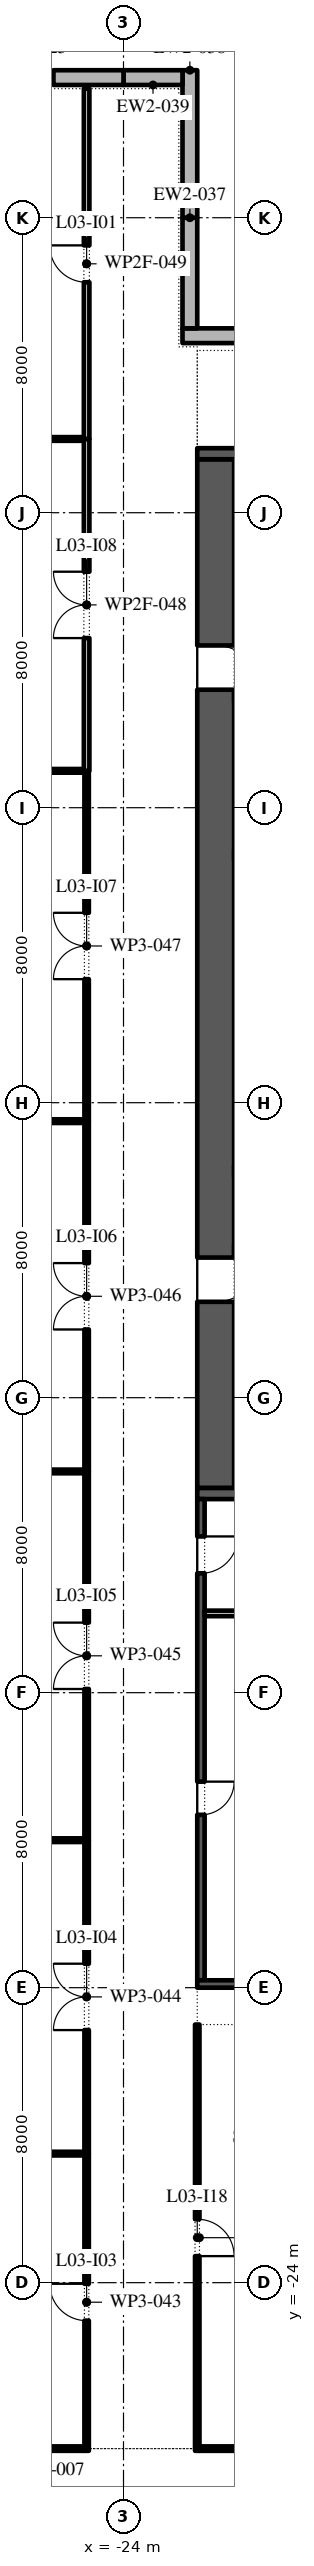
"""IFC4 building model, lengths in metres.
Left out: names, types, materials, properties, quantities, classifications, styles, units other than length and angle.
Written with IfcOpenShell. Run it as: python <this file> out.ifc"""

import sys

from ifc_helpers import new_model, si_unit, direction, frame, frame_2d, origin, place, context, subcontext, project, spatial, polyline, rectangle, outline, extrude, element, fill, save


model = new_model("IFC4")
c1 = context("Model", 3, precision=1e-05, world=origin(), true_north=direction((0.0, 1.0)))
c2 = subcontext(c1, "Body", "Model", "MODEL_VIEW")
j1 = project(units=[si_unit("LENGTHUNIT", "METRE"), si_unit("PLANEANGLEUNIT", "RADIAN")], contexts=[c1])
p1 = place(None, origin())
s1 = spatial("IfcSite", under=j1, at=p1, CompositionType="ELEMENT")
p2 = place(p1, origin())
s2 = spatial("IfcBuilding", under=s1, at=p2, CompositionType="ELEMENT")
p3 = place(p2, frame((0.0, 0.0, 19.2)))
s3 = spatial("IfcBuildingStorey", under=s2, at=p3, CompositionType="ELEMENT", Elevation=19.2)
p4 = place(p3, frame((-16.0, 28.8, 0.0), z_axis=(0.0, 0.0, 1.0), x_axis=(-1.0, 0.0, 0.0)))
e1 = element("IfcWall", 1, at=p4, inside=s3, PredefinedType="STANDARD", context=c2, shape_type="SweptSolid", body=[
    extrude(rectangle(XDim=6.4, YDim=0.4, at=frame_2d((3.2, 0.0))), origin(), (0.0, 0.0, 1.0), 4.5),
])
p5 = place(p3, frame((-22.2, 29.0, 0.0), z_axis=(0.0, 0.0, 1.0), x_axis=(0.0, 1.0, 0.0)))
e2 = element("IfcWall", 2, at=p5, inside=s3, PredefinedType="STANDARD", context=c2, shape_type="SweptSolid", body=[
    extrude(rectangle(XDim=3.0, YDim=0.4, at=frame_2d((1.5, 0.0))), origin(), (0.0, 0.0, 1.0), 4.5),
])
p6 = place(p3, frame((-22.2, 32.0, 0.0), z_axis=(0.0, 0.0, 1.0), x_axis=(0.0, 1.0, 0.0)))
e3 = element("IfcWall", 3, at=p6, inside=s3, PredefinedType="STANDARD", context=c2, shape_type="SweptSolid", body=[
    extrude(rectangle(XDim=4.0, YDim=0.4, at=frame_2d((2.0, 0.0))), origin(), (0.0, 0.0, 1.0), 4.5),
])
p7 = place(p3, frame((-22.4, 35.8, 0.0), z_axis=(0.0, 0.0, 1.0), x_axis=(-1.0, 0.0, 0.0)))
e4 = element("IfcWall", 4, at=p7, inside=s3, PredefinedType="STANDARD", context=c2, shape_type="SweptSolid", body=[
    extrude(rectangle(XDim=1.6, YDim=0.4, at=frame_2d((0.8, 0.0))), origin(), (0.0, 0.0, 1.0), 4.5),
])
p8 = place(p3, frame((-24.0, 35.8, 0.0), z_axis=(0.0, 0.0, 1.0), x_axis=(-1.0, 0.0, 0.0)))
e5 = element("IfcWall", 5, at=p8, inside=s3, PredefinedType="STANDARD", context=c2, shape_type="SweptSolid", body=[
    extrude(rectangle(XDim=8.0, YDim=0.4, at=frame_2d((4.0, 0.0))), origin(), (0.0, 0.0, 1.0), 4.5),
])
p9 = place(p8, frame((1.9, 0.0, 0.9)))
e6 = element("IfcOpeningElement", 6, at=p9, cuts=e5, PredefinedType="OPENING", context=c2, shape_type="SweptSolid", body=[
    extrude(outline(polyline([(0.0, 0.0), (1.8, 0.0), (1.8, 1.5), (1.785, 1.729), (1.738, 1.954), (1.662, 2.17), (1.558, 2.375), (1.427, 2.563), (1.271, 2.732), (1.095, 2.879), (0.9, 3.0), (0.705, 2.879), (0.529, 2.732), (0.373, 2.563), (0.242, 2.375), (0.138, 2.17), (0.062, 1.954), (0.015, 1.729), (0.0, 1.5), (0.0, 0.0)])), frame((0.0, 0.21, 0.0), z_axis=(0.0, -1.0, 0.0), x_axis=(1.0, 0.0, 0.0)), (0.0, 0.0, 1.0), 0.42),
])
p10 = place(p8, frame((4.3, 0.0, 0.9)))
e7 = element("IfcOpeningElement", 7, at=p10, cuts=e5, PredefinedType="OPENING", context=c2, shape_type="SweptSolid", body=[
    extrude(outline(polyline([(0.0, 0.0), (1.8, 0.0), (1.8, 1.5), (1.785, 1.729), (1.738, 1.954), (1.662, 2.17), (1.558, 2.375), (1.427, 2.563), (1.271, 2.732), (1.095, 2.879), (0.9, 3.0), (0.705, 2.879), (0.529, 2.732), (0.373, 2.563), (0.242, 2.375), (0.138, 2.17), (0.062, 1.954), (0.015, 1.729), (0.0, 1.5), (0.0, 0.0)])), frame((0.0, 0.21, 0.0), z_axis=(0.0, -1.0, 0.0), x_axis=(1.0, 0.0, 0.0)), (0.0, 0.0, 1.0), 0.42),
])
p11 = place(p3, frame((-21.5, -2.45, 0.0), z_axis=(0.0, 0.0, 1.0), x_axis=(0.0, 1.0, 0.0)))
e8 = element("IfcWall", 8, at=p11, inside=s3, PredefinedType="SHEAR", context=c2, shape_type="SweptSolid", body=[
    extrude(rectangle(XDim=27.9, YDim=1.0, at=frame_2d((13.95, 0.0))), origin(), (0.0, 0.0, 1.0), 4.5),
])
p12 = place(p11, frame((5.05, 0.0, 0.0)))
e9 = element("IfcOpeningElement", 9, at=p12, cuts=e8, PredefinedType="OPENING", context=c2, shape_type="SweptSolid", body=[
    extrude(rectangle(XDim=1.2, YDim=2.1, at=frame_2d((0.6, 1.05))), frame((0.0, 0.51, 0.0), z_axis=(0.0, -1.0, 0.0), x_axis=(1.0, 0.0, 0.0)), (0.0, 0.0, 1.0), 1.02),
])
p13 = place(p11, frame((21.65, 0.0, 0.0)))
e10 = element("IfcOpeningElement", 10, at=p13, cuts=e8, PredefinedType="OPENING", context=c2, shape_type="SweptSolid", body=[
    extrude(rectangle(XDim=1.2, YDim=2.1, at=frame_2d((0.6, 1.05))), frame((0.0, 0.51, 0.0), z_axis=(0.0, -1.0, 0.0), x_axis=(1.0, 0.0, 0.0)), (0.0, 0.0, 1.0), 1.02),
])
for number, where, z_axis, x_axis in (
    (11, (-22.0, -2.6, 0.0), (0.0, 0.0, 1.0), (1.0, 0.0, 0.0)),
    (12, (-22.0, 25.6, 0.0), (0.0, 0.0, 1.0), (1.0, 0.0, 0.0)),
):
    element("IfcWall", number, at=place(p3, frame(where, z_axis=z_axis, x_axis=x_axis)), inside=s3, PredefinedType="SHEAR", context=c2, shape_type="SweptSolid", body=[
        extrude(rectangle(XDim=12.0, YDim=0.3, at=frame_2d((6.0, 0.0))), origin(), (0.0, 0.0, 1.0), 4.5),
    ])
p14 = place(p3, frame((-21.9, -15.8, 0.0), z_axis=(0.0, 0.0, 1.0), x_axis=(0.0, 1.0, 0.0)))
e13 = element("IfcWall", 13, at=p14, inside=s3, PredefinedType="SHEAR", context=c2, shape_type="SweptSolid", body=[
    extrude(rectangle(XDim=13.05, YDim=0.2, at=frame_2d((6.525, 0.0))), origin(), (0.0, 0.0, 1.0), 4.5),
])
p15 = place(p14, frame((4.488, 0.0, 0.0)))
e14 = element("IfcOpeningElement", 14, at=p15, cuts=e13, PredefinedType="OPENING", context=c2, shape_type="SweptSolid", body=[
    extrude(rectangle(XDim=0.9, YDim=2.1, at=frame_2d((0.45, 1.05))), frame((0.0, 0.11, 0.0), z_axis=(0.0, -1.0, 0.0), x_axis=(1.0, 0.0, 0.0)), (0.0, 0.0, 1.0), 0.22),
])
p16 = place(p14, frame((11.038, 0.0, 0.0)))
e15 = element("IfcOpeningElement", 15, at=p16, cuts=e13, PredefinedType="OPENING", context=c2, shape_type="SweptSolid", body=[
    extrude(rectangle(XDim=1.0, YDim=2.1, at=frame_2d((0.5, 1.05))), frame((0.0, 0.11, 0.0), z_axis=(0.0, -1.0, 0.0), x_axis=(1.0, 0.0, 0.0)), (0.0, 0.0, 1.0), 0.22),
])
p17 = place(p3, frame((-22.0, -15.9, 0.0), z_axis=(0.0, 0.0, 1.0), x_axis=(1.0, 0.0, 0.0)))
e16 = element("IfcWall", 16, at=p17, inside=s3, PredefinedType="SHEAR", context=c2, shape_type="SweptSolid", body=[
    extrude(rectangle(XDim=12.0, YDim=0.2, at=frame_2d((6.0, 0.0))), origin(), (0.0, 0.0, 1.0), 4.5),
])
p18 = place(p3, frame((-21.8, -5.85, 0.0), z_axis=(0.0, 0.0, 1.0), x_axis=(1.0, 0.0, 0.0)))
e17 = element("IfcWall", 17, at=p18, inside=s3, PredefinedType="PARTITIONING", context=c2, shape_type="SweptSolid", body=[
    extrude(rectangle(XDim=5.725, YDim=0.15, at=frame_2d((2.863, 0.0))), origin(), (0.0, 0.0, 1.0), 4.5),
])
p19 = place(p3, frame((-27.0, -28.5, 0.0), z_axis=(0.0, 0.0, 1.0), x_axis=(1.0, 0.0, 0.0)))
e18 = element("IfcWall", 18, at=p19, inside=s3, PredefinedType="PARTITIONING", context=c2, shape_type="SweptSolid", body=[
    extrude(rectangle(XDim=1.94, YDim=0.12, at=frame_2d((0.97, 0.0))), origin(), (0.0, 0.0, 1.0), 4.5),
])
p20 = place(p3, frame((-21.94, -28.5, 0.0), z_axis=(0.0, 0.0, 1.0), x_axis=(1.0, 0.0, 0.0)))
e19 = element("IfcWall", 19, at=p20, inside=s3, PredefinedType="PARTITIONING", context=c2, shape_type="SweptSolid", body=[
    extrude(rectangle(XDim=11.54, YDim=0.12, at=frame_2d((5.77, 0.0))), origin(), (0.0, 0.0, 1.0), 4.5),
])
for number, where, z_axis, x_axis in (
    (20, (-43.5, -20.5, 0.0), (0.0, 0.0, 1.0), (1.0, 0.0, 0.0)),
    (21, (-43.5, -12.0, 0.0), (0.0, 0.0, 1.0), (1.0, 0.0, 0.0)),
    (22, (-43.5, -2.0, 0.0), (0.0, 0.0, 1.0), (1.0, 0.0, 0.0)),
    (23, (-43.5, 7.5, 0.0), (0.0, 0.0, 1.0), (1.0, 0.0, 0.0)),
):
    element("IfcWall", number, at=place(p3, frame(where, z_axis=z_axis, x_axis=x_axis)), inside=s3, PredefinedType="PARTITIONING", context=c2, shape_type="SweptSolid", body=[
        extrude(rectangle(XDim=18.44, YDim=0.1, at=frame_2d((9.22, 0.0))), origin(), (0.0, 0.0, 1.0), 4.5),
    ])
p21 = place(p3, frame((-43.5, 17.0, 0.0), z_axis=(0.0, 0.0, 1.0), x_axis=(1.0, 0.0, 0.0)))
e24 = element("IfcWall", 24, at=p21, inside=s3, PredefinedType="PARTITIONING", context=c2, shape_type="SweptSolid", body=[
    extrude(rectangle(XDim=18.425, YDim=0.1, at=frame_2d((9.212, 0.0))), origin(), (0.0, 0.0, 1.0), 4.5),
])
p22 = place(p3, frame((-34.0, 26.0, 0.0), z_axis=(0.0, 0.0, 1.0), x_axis=(1.0, 0.0, 0.0)))
e25 = element("IfcWall", 25, at=p22, inside=s3, PredefinedType="PARTITIONING", context=c2, shape_type="SweptSolid", body=[
    extrude(rectangle(XDim=8.925, YDim=0.1, at=frame_2d((4.462, 0.0))), origin(), (0.0, 0.0, 1.0), 4.5),
])
p23 = place(p3, frame((-25.0, -28.56, 0.0), z_axis=(0.0, 0.0, 1.0), x_axis=(0.0, 1.0, 0.0)))
e26 = element("IfcWall", 26, at=p23, inside=s3, PredefinedType="PARTITIONING", context=c2, shape_type="SweptSolid", body=[
    extrude(rectangle(XDim=8.06, YDim=0.12, at=frame_2d((4.03, 0.0))), origin(), (0.0, 0.0, 1.0), 4.5),
])
p24 = place(p23, frame((3.53, 0.0, 0.0)))
e27 = element("IfcOpeningElement", 27, at=p24, cuts=e26, PredefinedType="OPENING", context=c2, shape_type="SweptSolid", body=[
    extrude(rectangle(XDim=1.0, YDim=2.1, at=frame_2d((0.5, 1.05))), frame((0.0, 0.07, 0.0), z_axis=(0.0, -1.0, 0.0), x_axis=(1.0, 0.0, 0.0)), (0.0, 0.0, 1.0), 0.14),
])
p25 = place(p3, frame((-25.0, -20.5, 0.0), z_axis=(0.0, 0.0, 1.0), x_axis=(0.0, 1.0, 0.0)))
e28 = element("IfcWall", 28, at=p25, inside=s3, PredefinedType="PARTITIONING", context=c2, shape_type="SweptSolid", body=[
    extrude(rectangle(XDim=8.5, YDim=0.12, at=frame_2d((4.25, 0.0))), origin(), (0.0, 0.0, 1.0), 4.5),
])
p26 = place(p25, frame((3.35, 0.0, 0.0)))
e29 = element("IfcOpeningElement", 29, at=p26, cuts=e28, PredefinedType="OPENING", context=c2, shape_type="SweptSolid", body=[
    extrude(rectangle(XDim=1.8, YDim=2.1, at=frame_2d((0.9, 1.05))), frame((0.0, 0.07, 0.0), z_axis=(0.0, -1.0, 0.0), x_axis=(1.0, 0.0, 0.0)), (0.0, 0.0, 1.0), 0.14),
])
p27 = place(p3, frame((-25.0, -12.0, 0.0), z_axis=(0.0, 0.0, 1.0), x_axis=(0.0, 1.0, 0.0)))
e30 = element("IfcWall", 30, at=p27, inside=s3, PredefinedType="PARTITIONING", context=c2, shape_type="SweptSolid", body=[
    extrude(rectangle(XDim=10.0, YDim=0.12, at=frame_2d((5.0, 0.0))), origin(), (0.0, 0.0, 1.0), 4.5),
])
p28 = place(p27, frame((4.1, 0.0, 0.0)))
e31 = element("IfcOpeningElement", 31, at=p28, cuts=e30, PredefinedType="OPENING", context=c2, shape_type="SweptSolid", body=[
    extrude(rectangle(XDim=1.8, YDim=2.1, at=frame_2d((0.9, 1.05))), frame((0.0, 0.07, 0.0), z_axis=(0.0, -1.0, 0.0), x_axis=(1.0, 0.0, 0.0)), (0.0, 0.0, 1.0), 0.14),
])
p29 = place(p3, frame((-25.0, -2.0, 0.0), z_axis=(0.0, 0.0, 1.0), x_axis=(0.0, 1.0, 0.0)))
e32 = element("IfcWall", 32, at=p29, inside=s3, PredefinedType="PARTITIONING", context=c2, shape_type="SweptSolid", body=[
    extrude(rectangle(XDim=9.5, YDim=0.12, at=frame_2d((4.75, 0.0))), origin(), (0.0, 0.0, 1.0), 4.5),
])
p30 = place(p29, frame((3.85, 0.0, 0.0)))
e33 = element("IfcOpeningElement", 33, at=p30, cuts=e32, PredefinedType="OPENING", context=c2, shape_type="SweptSolid", body=[
    extrude(rectangle(XDim=1.8, YDim=2.1, at=frame_2d((0.9, 1.05))), frame((0.0, 0.07, 0.0), z_axis=(0.0, -1.0, 0.0), x_axis=(1.0, 0.0, 0.0)), (0.0, 0.0, 1.0), 0.14),
])
p31 = place(p3, frame((-25.0, 7.5, 0.0), z_axis=(0.0, 0.0, 1.0), x_axis=(0.0, 1.0, 0.0)))
e34 = element("IfcWall", 34, at=p31, inside=s3, PredefinedType="PARTITIONING", context=c2, shape_type="SweptSolid", body=[
    extrude(rectangle(XDim=9.5, YDim=0.12, at=frame_2d((4.75, 0.0))), origin(), (0.0, 0.0, 1.0), 4.5),
])
p32 = place(p31, frame((3.85, 0.0, 0.0)))
e35 = element("IfcOpeningElement", 35, at=p32, cuts=e34, PredefinedType="OPENING", context=c2, shape_type="SweptSolid", body=[
    extrude(rectangle(XDim=1.8, YDim=2.1, at=frame_2d((0.9, 1.05))), frame((0.0, 0.07, 0.0), z_axis=(0.0, -1.0, 0.0), x_axis=(1.0, 0.0, 0.0)), (0.0, 0.0, 1.0), 0.14),
])
p33 = place(p3, frame((-25.0, 17.0, 0.0), z_axis=(0.0, 0.0, 1.0), x_axis=(0.0, 1.0, 0.0)))
e36 = element("IfcWall", 36, at=p33, inside=s3, PredefinedType="PARTITIONING", context=c2, shape_type="SweptSolid", body=[
    extrude(rectangle(XDim=9.0, YDim=0.15, at=frame_2d((4.5, 0.0))), origin(), (0.0, 0.0, 1.0), 4.5),
])
p34 = place(p33, frame((3.6, 0.0, 0.0)))
e37 = element("IfcOpeningElement", 37, at=p34, cuts=e36, PredefinedType="OPENING", context=c2, shape_type="SweptSolid", body=[
    extrude(rectangle(XDim=1.8, YDim=2.1, at=frame_2d((0.9, 1.05))), frame((0.0, 0.085, 0.0), z_axis=(0.0, -1.0, 0.0), x_axis=(1.0, 0.0, 0.0)), (0.0, 0.0, 1.0), 0.17),
])
p35 = place(p3, frame((-25.0, 26.0, 0.0), z_axis=(0.0, 0.0, 1.0), x_axis=(0.0, 1.0, 0.0)))
e38 = element("IfcWall", 38, at=p35, inside=s3, PredefinedType="PARTITIONING", context=c2, shape_type="SweptSolid", body=[
    extrude(rectangle(XDim=9.5, YDim=0.15, at=frame_2d((4.75, 0.0))), origin(), (0.0, 0.0, 1.0), 4.5),
])
p36 = place(p35, frame((4.25, 0.0, 0.0)))
e39 = element("IfcOpeningElement", 39, at=p36, cuts=e38, PredefinedType="OPENING", context=c2, shape_type="SweptSolid", body=[
    extrude(rectangle(XDim=1.0, YDim=2.1, at=frame_2d((0.5, 1.05))), frame((0.0, 0.085, 0.0), z_axis=(0.0, -1.0, 0.0), x_axis=(1.0, 0.0, 0.0)), (0.0, 0.0, 1.0), 0.17),
])
p37 = place(p3, frame((-22.0, -28.56, 0.0), z_axis=(0.0, 0.0, 1.0), x_axis=(0.0, 1.0, 0.0)))
e40 = element("IfcWall", 40, at=p37, inside=s3, PredefinedType="PARTITIONING", context=c2, shape_type="SweptSolid", body=[
    extrude(rectangle(XDim=11.56, YDim=0.12, at=frame_2d((5.78, 0.0))), origin(), (0.0, 0.0, 1.0), 4.5),
])
p38 = place(p37, frame((5.28, 0.0, 0.0)))
e41 = element("IfcOpeningElement", 41, at=p38, cuts=e40, PredefinedType="OPENING", context=c2, shape_type="SweptSolid", body=[
    extrude(rectangle(XDim=1.0, YDim=2.1, at=frame_2d((0.5, 1.05))), frame((0.0, 0.07, 0.0), z_axis=(0.0, -1.0, 0.0), x_axis=(1.0, 0.0, 0.0)), (0.0, 0.0, 1.0), 0.14),
])
p39 = place(p9, origin())
e42 = element("IfcWindow", 42, at=p39, inside=s3, PartitioningType="DOUBLE_PANEL_VERTICAL", PredefinedType="WINDOW", context=c2, shape_type="SweptSolid", body=[
    extrude(outline(polyline([(0.0, 0.0), (1.8, 0.0), (1.8, 1.5), (1.785, 1.729), (1.738, 1.954), (1.662, 2.17), (1.558, 2.375), (1.427, 2.563), (1.271, 2.732), (1.095, 2.879), (0.9, 3.0), (0.705, 2.879), (0.529, 2.732), (0.373, 2.563), (0.242, 2.375), (0.138, 2.17), (0.062, 1.954), (0.015, 1.729), (0.0, 1.5), (0.0, 0.0)])), frame((0.0, 0.03, 0.0), z_axis=(0.0, -1.0, 0.0), x_axis=(1.0, 0.0, 0.0)), (0.0, 0.0, 1.0), 0.06),
])
fill(e6, e42)
p40 = place(p12, frame((1.2, 0.0, 0.0), z_axis=(0.0, 0.0, 1.0), x_axis=(-1.0, 0.0, 0.0)))
e43 = element("IfcDoor", 43, at=p40, inside=s3, OperationType="SINGLE_SWING_RIGHT", PredefinedType="DOOR", context=c2, shape_type="SweptSolid", body=[
    extrude(rectangle(XDim=1.2, YDim=2.1, at=frame_2d((0.6, 1.05))), frame((0.0, 0.025, 0.0), z_axis=(0.0, -1.0, 0.0), x_axis=(1.0, 0.0, 0.0)), (0.0, 0.0, 1.0), 0.05),
])
fill(e9, e43)
p41 = place(p13, frame((1.2, 0.0, 0.0), z_axis=(0.0, 0.0, 1.0), x_axis=(-1.0, 0.0, 0.0)))
e44 = element("IfcDoor", 44, at=p41, inside=s3, OperationType="SINGLE_SWING_LEFT", PredefinedType="DOOR", context=c2, shape_type="SweptSolid", body=[
    extrude(rectangle(XDim=1.2, YDim=2.1, at=frame_2d((0.6, 1.05))), frame((0.0, 0.025, 0.0), z_axis=(0.0, -1.0, 0.0), x_axis=(1.0, 0.0, 0.0)), (0.0, 0.0, 1.0), 0.05),
])
fill(e10, e44)
p42 = place(p15, frame((0.9, -0.15, 0.0), z_axis=(0.0, 0.0, 1.0), x_axis=(-1.0, 0.0, 0.0)))
e45 = element("IfcDoor", 45, at=p42, inside=s3, OperationType="SINGLE_SWING_RIGHT", PredefinedType="DOOR", context=c2, shape_type="SweptSolid", body=[
    extrude(rectangle(XDim=0.9, YDim=2.1, at=frame_2d((0.45, 1.05))), frame((0.0, -0.05, 0.0), z_axis=(0.0, -1.0, 0.0), x_axis=(1.0, 0.0, 0.0)), (0.0, 0.0, 1.0), 0.05),
])
fill(e14, e45)
p43 = place(p16, frame((1.0, -0.15, 0.0), z_axis=(0.0, 0.0, 1.0), x_axis=(-1.0, 0.0, 0.0)))
e46 = element("IfcDoor", 46, at=p43, inside=s3, OperationType="SINGLE_SWING_RIGHT", PredefinedType="DOOR", context=c2, shape_type="SweptSolid", body=[
    extrude(rectangle(XDim=1.0, YDim=2.1, at=frame_2d((0.5, 1.05))), frame((0.0, -0.05, 0.0), z_axis=(0.0, -1.0, 0.0), x_axis=(1.0, 0.0, 0.0)), (0.0, 0.0, 1.0), 0.05),
])
fill(e15, e46)
p44 = place(p36, origin())
e47 = element("IfcDoor", 47, at=p44, inside=s3, OperationType="SINGLE_SWING_LEFT", PredefinedType="DOOR", context=c2, shape_type="SweptSolid", body=[
    extrude(rectangle(XDim=1.0, YDim=2.1, at=frame_2d((0.5, 1.05))), frame((0.0, 0.025, 0.0), z_axis=(0.0, -1.0, 0.0), x_axis=(1.0, 0.0, 0.0)), (0.0, 0.0, 1.0), 0.05),
])
fill(e39, e47)
p45 = place(p24, origin())
e48 = element("IfcDoor", 48, at=p45, inside=s3, OperationType="SINGLE_SWING_LEFT", PredefinedType="DOOR", context=c2, shape_type="SweptSolid", body=[
    extrude(rectangle(XDim=1.0, YDim=2.1, at=frame_2d((0.5, 1.05))), frame((0.0, 0.025, 0.0), z_axis=(0.0, -1.0, 0.0), x_axis=(1.0, 0.0, 0.0)), (0.0, 0.0, 1.0), 0.05),
])
fill(e27, e48)
p46 = place(p26, origin())
e49 = element("IfcDoor", 49, at=p46, inside=s3, OperationType="SINGLE_SWING_RIGHT", PredefinedType="DOOR", context=c2, shape_type="SweptSolid", body=[
    extrude(rectangle(XDim=1.8, YDim=2.1, at=frame_2d((0.9, 1.05))), frame((0.0, 0.025, 0.0), z_axis=(0.0, -1.0, 0.0), x_axis=(1.0, 0.0, 0.0)), (0.0, 0.0, 1.0), 0.05),
])
fill(e29, e49)
p47 = place(p28, origin())
e50 = element("IfcDoor", 50, at=p47, inside=s3, OperationType="SINGLE_SWING_RIGHT", PredefinedType="DOOR", context=c2, shape_type="SweptSolid", body=[
    extrude(rectangle(XDim=1.8, YDim=2.1, at=frame_2d((0.9, 1.05))), frame((0.0, 0.025, 0.0), z_axis=(0.0, -1.0, 0.0), x_axis=(1.0, 0.0, 0.0)), (0.0, 0.0, 1.0), 0.05),
])
fill(e31, e50)
p48 = place(p30, origin())
e51 = element("IfcDoor", 51, at=p48, inside=s3, OperationType="SINGLE_SWING_RIGHT", PredefinedType="DOOR", context=c2, shape_type="SweptSolid", body=[
    extrude(rectangle(XDim=1.8, YDim=2.1, at=frame_2d((0.9, 1.05))), frame((0.0, 0.025, 0.0), z_axis=(0.0, -1.0, 0.0), x_axis=(1.0, 0.0, 0.0)), (0.0, 0.0, 1.0), 0.05),
])
fill(e33, e51)
p49 = place(p32, origin())
e52 = element("IfcDoor", 52, at=p49, inside=s3, OperationType="SINGLE_SWING_RIGHT", PredefinedType="DOOR", context=c2, shape_type="SweptSolid", body=[
    extrude(rectangle(XDim=1.8, YDim=2.1, at=frame_2d((0.9, 1.05))), frame((0.0, 0.025, 0.0), z_axis=(0.0, -1.0, 0.0), x_axis=(1.0, 0.0, 0.0)), (0.0, 0.0, 1.0), 0.05),
])
fill(e35, e52)
p50 = place(p34, origin())
e53 = element("IfcDoor", 53, at=p50, inside=s3, OperationType="SINGLE_SWING_LEFT", PredefinedType="DOOR", context=c2, shape_type="SweptSolid", body=[
    extrude(rectangle(XDim=1.8, YDim=2.1, at=frame_2d((0.9, 1.05))), frame((0.0, 0.025, 0.0), z_axis=(0.0, -1.0, 0.0), x_axis=(1.0, 0.0, 0.0)), (0.0, 0.0, 1.0), 0.05),
])
fill(e37, e53)
p51 = place(p38, frame((1.0, 0.0, 0.0), z_axis=(0.0, 0.0, 1.0), x_axis=(-1.0, 0.0, 0.0)))
e54 = element("IfcDoor", 54, at=p51, inside=s3, OperationType="SINGLE_SWING_LEFT", PredefinedType="DOOR", context=c2, shape_type="SweptSolid", body=[
    extrude(rectangle(XDim=1.0, YDim=2.1, at=frame_2d((0.5, 1.05))), frame((0.0, 0.025, 0.0), z_axis=(0.0, -1.0, 0.0), x_axis=(1.0, 0.0, 0.0)), (0.0, 0.0, 1.0), 0.05),
])
fill(e41, e54)
save(model, sys.argv[1])
